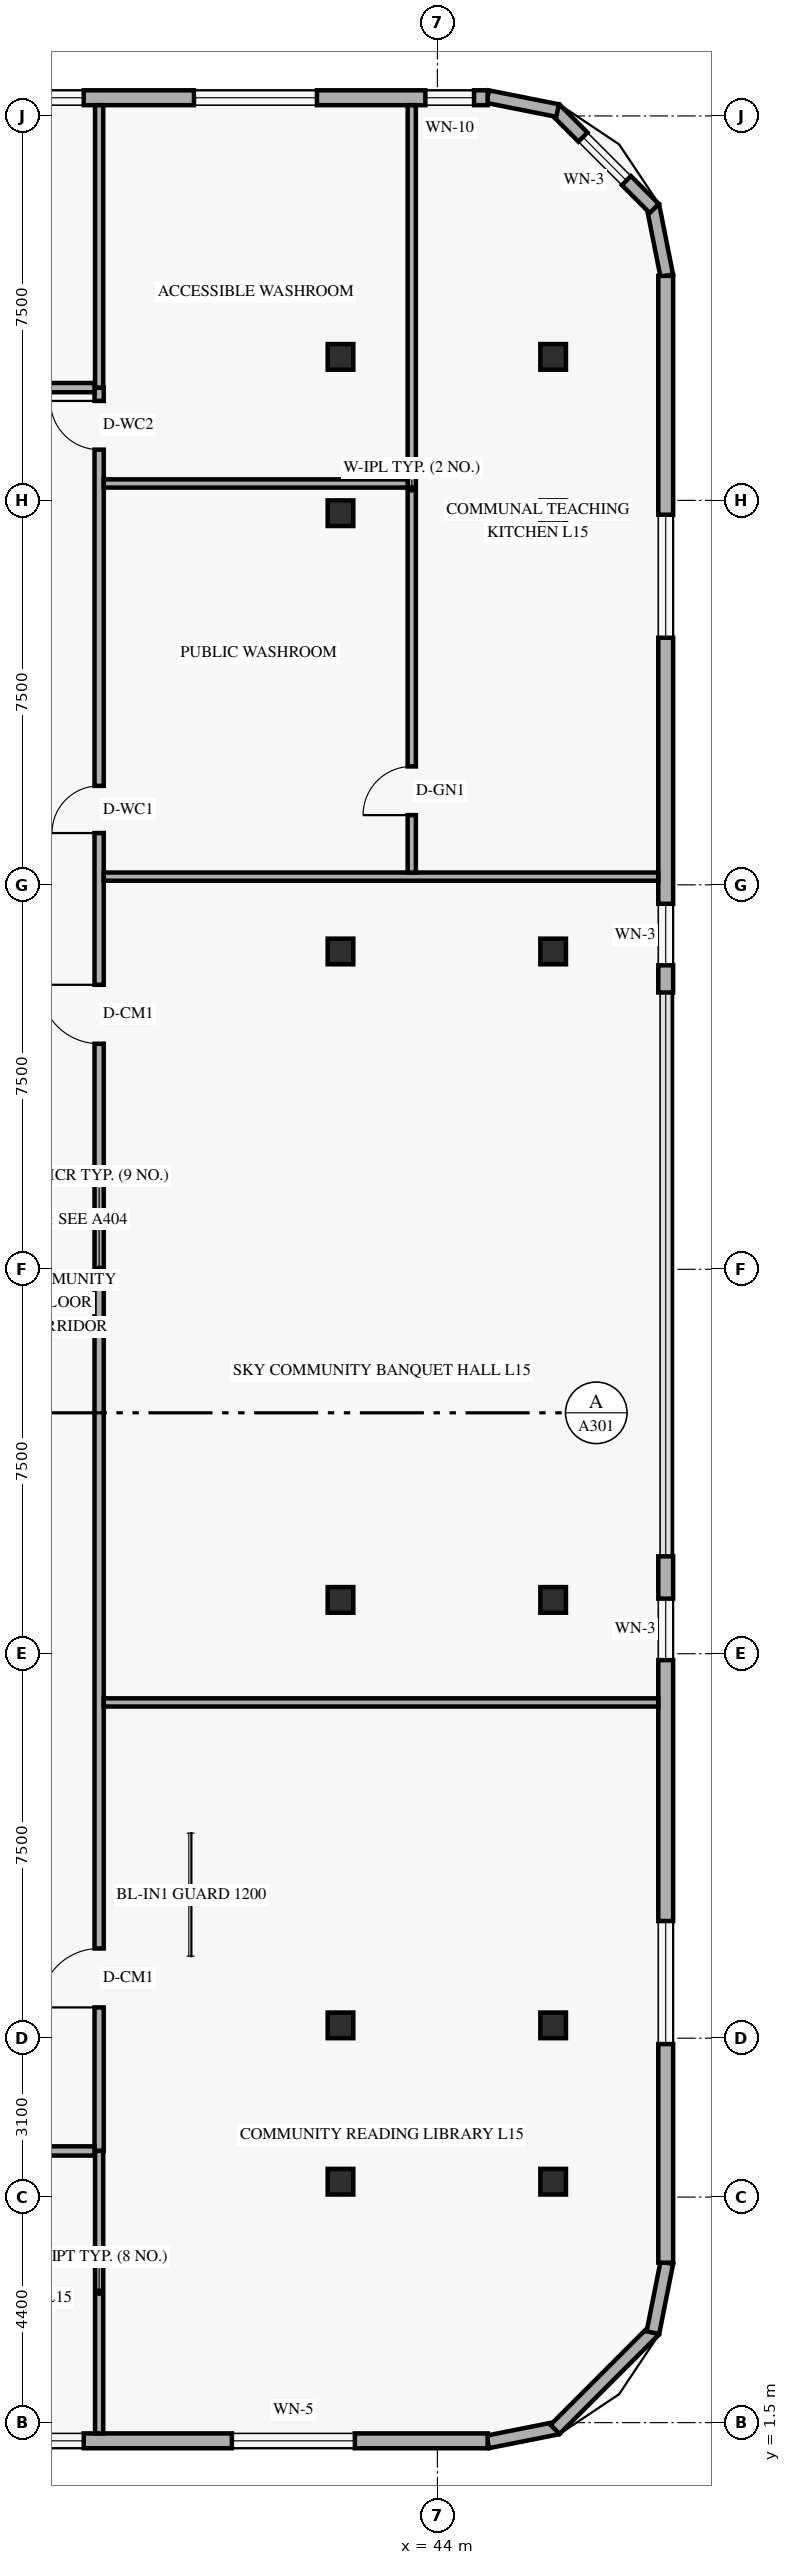
"""IFC4 building model, lengths in metres.
Left out: names, types, materials, properties, quantities, classifications, styles, units other than length and angle.
Written with IfcOpenShell. Run it as: python <this file> out.ifc"""

import sys

from ifc_helpers import new_model, si_unit, direction, frame, frame_2d, origin, origin_2d, place, context, subcontext, project, spatial, rectangle, hollow_rectangle, extrude, element, fill, save


model = new_model("IFC4")
c1 = context("Model", 3, precision=1e-05, world=origin(), true_north=direction((0.0, 1.0)))
c2 = subcontext(c1, "Body", "Model", "MODEL_VIEW")
j1 = project(units=[si_unit("LENGTHUNIT", "METRE"), si_unit("PLANEANGLEUNIT", "RADIAN")], contexts=[c1])
p1 = place(None, origin())
s1 = spatial("IfcSite", under=j1, at=p1, CompositionType="ELEMENT")
p2 = place(p1, origin())
s2 = spatial("IfcBuilding", under=s1, at=p2, CompositionType="ELEMENT")
p3 = place(p2, frame((0.0, 0.0, 60.0)))
s3 = spatial("IfcBuildingStorey", under=s2, at=p3, CompositionType="ELEMENT", Elevation=60.0)
for number, where, z_axis, x_axis in (
    (1, (42.036, 6.2, 0.0), (0.035, 0.0, 0.999), (0.0, 1.0, 0.0)),
    (2, (42.036, 9.25, 0.0), (0.035, 0.0, 0.999), (0.0, 1.0, 0.0)),
    (3, (42.036, 17.55, 0.0), (0.035, 0.0, 0.999), (0.0, 1.0, 0.0)),
    (4, (42.036, 30.2, 0.0), (0.035, 0.0, 0.999), (0.0, 1.0, 0.0)),
    (5, (42.036, 38.75, 0.0), (0.035, 0.0, 0.999), (0.0, 1.0, 0.0)),
    (6, (42.036, 41.8, 0.0), (0.035, 0.0, 0.999), (0.0, 1.0, 0.0)),
):
    element("IfcColumn", number, at=place(p3, frame(where, z_axis=z_axis, x_axis=x_axis)), inside=s3, PredefinedType="COLUMN", context=c2, shape_type="SweptSolid", body=[
        extrude(hollow_rectangle(XDim=0.5, YDim=0.5, WallThickness=0.022, at=origin_2d()), origin(), (0.0, 0.0, 1.0), 4.203),
    ])
for number, where, z_axis, x_axis in (
    (7, (46.137, 6.2, 0.0), (0.058, 0.0, 0.998), (0.0, 1.0, 0.0)),
    (8, (46.137, 9.25, 0.0), (0.058, 0.0, 0.998), (0.0, 1.0, 0.0)),
    (9, (46.137, 17.55, 0.0), (0.058, 0.0, 0.998), (0.0, 1.0, 0.0)),
    (10, (46.137, 30.2, 0.0), (0.058, 0.0, 0.998), (0.0, 1.0, 0.0)),
    (11, (46.137, 38.75, 0.0), (0.058, 0.0, 0.998), (0.0, 1.0, 0.0)),
    (12, (46.137, 41.8, 0.0), (0.058, 0.0, 0.998), (0.0, 1.0, 0.0)),
):
    element("IfcColumn", number, at=place(p3, frame(where, z_axis=z_axis, x_axis=x_axis)), inside=s3, PredefinedType="COLUMN", context=c2, shape_type="SweptSolid", body=[
        extrude(hollow_rectangle(XDim=0.5, YDim=0.5, WallThickness=0.022, at=origin_2d()), origin(), (0.0, 0.0, 1.0), 4.207),
    ])
p4 = place(p3, frame((44.983, 1.124, 0.0), z_axis=(0.0, 0.0, 1.0), x_axis=(0.980809899341, 0.19496651342, 0.0)))
e13 = element("IfcWall", 13, at=p4, inside=s3, PredefinedType="SOLIDWALL", context=c2, shape_type="SweptSolid", body=[
    extrude(rectangle(XDim=1.389, YDim=0.25, at=frame_2d((0.694, 0.0))), origin(), (0.0, 0.0, 1.0), 3.96),
])
p5 = place(p3, frame((46.295, 1.368, 0.0), z_axis=(0.0, 0.0, 1.0), x_axis=(0.707106781187, 0.707106781187, 0.0)))
e14 = element("IfcWall", 14, at=p5, inside=s3, PredefinedType="SOLIDWALL", context=c2, shape_type="SweptSolid", body=[
    extrude(rectangle(XDim=2.739, YDim=0.25, at=frame_2d((1.37, 0.0))), origin(), (0.0, 0.0, 1.0), 3.96),
])
for number, where, z_axis, x_axis in (
    (15, (48.205, 3.254, 0.0), (0.0, 0.0, 1.0), (0.195, 0.981, 0.0)),
    (16, (48.476, 43.384, 0.0), (0.0, 0.0, 1.0), (-0.195, 0.981, 0.0)),
):
    element("IfcWall", number, at=place(p3, frame(where, z_axis=z_axis, x_axis=x_axis)), inside=s3, PredefinedType="SOLIDWALL", context=c2, shape_type="SweptSolid", body=[
        extrude(rectangle(XDim=1.389, YDim=0.25, at=frame_2d((0.694, 0.0))), origin(), (0.0, 0.0, 1.0), 3.96),
    ])
p6 = place(p3, frame((48.232, 44.695, 0.0), z_axis=(0.0, 0.0, 1.0), x_axis=(-0.707106781187, 0.707106781187, 0.0)))
e17 = element("IfcWall", 17, at=p6, inside=s3, PredefinedType="SOLIDWALL", context=c2, shape_type="SweptSolid", body=[
    extrude(rectangle(XDim=2.739, YDim=0.25, at=frame_2d((1.37, 0.0))), origin(), (0.0, 0.0, 1.0), 3.96),
])
p7 = place(p6, frame((0.77, 0.0, 0.85)))
e18 = element("IfcOpeningElement", 18, at=p7, cuts=e17, PredefinedType="OPENING", context=c2, shape_type="SweptSolid", body=[
    extrude(rectangle(XDim=1.2, YDim=1.5, at=frame_2d((0.6, 0.75))), frame((0.0, 0.135, 0.0), z_axis=(0.0, -1.0, 0.0), x_axis=(1.0, 0.0, 0.0)), (0.0, 0.0, 1.0), 0.27),
])
p8 = place(p3, frame((46.345, 46.605, 0.0), z_axis=(0.0, 0.0, 1.0), x_axis=(-0.980809899341, 0.19496651342, 0.0)))
e19 = element("IfcWall", 19, at=p8, inside=s3, PredefinedType="SOLIDWALL", context=c2, shape_type="SweptSolid", body=[
    extrude(rectangle(XDim=1.389, YDim=0.25, at=frame_2d((0.694, 0.0))), origin(), (0.0, 0.0, 1.0), 3.96),
])
p9 = place(p3, frame((34.4, 1.145, 0.0), z_axis=(0.0, 0.0, 1.0), x_axis=(1.0, 0.0, 0.0)))
e20 = element("IfcWall", 20, at=p9, inside=s3, PredefinedType="SOLIDWALL", context=c2, shape_type="SweptSolid", body=[
    extrude(rectangle(XDim=10.58, YDim=0.29, at=frame_2d((5.29, 0.0))), origin(), (0.0, 0.0, 1.0), 3.96),
])
p10 = place(p9, frame((0.3, 0.0, 0.85)))
e21 = element("IfcOpeningElement", 21, at=p10, cuts=e20, PredefinedType="OPENING", context=c2, shape_type="SweptSolid", body=[
    extrude(rectangle(XDim=2.4, YDim=1.9, at=frame_2d((1.2, 0.95))), frame((0.0, 0.155, 0.0), z_axis=(0.0, -1.0, 0.0), x_axis=(1.0, 0.0, 0.0)), (0.0, 0.0, 1.0), 0.31),
])
p11 = place(p9, frame((5.59, 0.0, 0.85)))
e22 = element("IfcOpeningElement", 22, at=p11, cuts=e20, PredefinedType="OPENING", context=c2, shape_type="SweptSolid", body=[
    extrude(rectangle(XDim=2.4, YDim=1.9, at=frame_2d((1.2, 0.95))), frame((0.0, 0.155, 0.0), z_axis=(0.0, -1.0, 0.0), x_axis=(1.0, 0.0, 0.0)), (0.0, 0.0, 1.0), 0.31),
])
p12 = place(p3, frame((48.455, 4.62, 0.0), z_axis=(0.0, 0.0, 1.0), x_axis=(0.0, 1.0, 0.0)))
e23 = element("IfcWall", 23, at=p12, inside=s3, PredefinedType="SOLIDWALL", context=c2, shape_type="SweptSolid", body=[
    extrude(rectangle(XDim=13.78, YDim=0.29, at=frame_2d((6.89, 0.0))), origin(), (0.0, 0.0, 1.0), 3.96),
])
p13 = place(p12, frame((4.265, 0.0, 0.85)))
e24 = element("IfcOpeningElement", 24, at=p13, cuts=e23, PredefinedType="OPENING", context=c2, shape_type="SweptSolid", body=[
    extrude(rectangle(XDim=2.4, YDim=1.9, at=frame_2d((1.2, 0.95))), frame((0.0, 0.155, 0.0), z_axis=(0.0, -1.0, 0.0), x_axis=(1.0, 0.0, 0.0)), (0.0, 0.0, 1.0), 0.31),
])
p14 = place(p12, frame((11.755, 0.0, 0.85)))
e25 = element("IfcOpeningElement", 25, at=p14, cuts=e23, PredefinedType="OPENING", context=c2, shape_type="SweptSolid", body=[
    extrude(rectangle(XDim=1.2, YDim=1.5, at=frame_2d((0.6, 0.75))), frame((0.0, 0.155, 0.0), z_axis=(0.0, -1.0, 0.0), x_axis=(1.0, 0.0, 0.0)), (0.0, 0.0, 1.0), 0.31),
])
p15 = place(p3, frame((48.455, 29.4, 0.0), z_axis=(0.0, 0.0, 1.0), x_axis=(0.0, 1.0, 0.0)))
e26 = element("IfcWall", 26, at=p15, inside=s3, PredefinedType="SOLIDWALL", context=c2, shape_type="SweptSolid", body=[
    extrude(rectangle(XDim=13.98, YDim=0.29, at=frame_2d((6.99, 0.0))), origin(), (0.0, 0.0, 1.0), 3.96),
])
p16 = place(p15, frame((0.53, 0.0, 0.85)))
e27 = element("IfcOpeningElement", 27, at=p16, cuts=e26, PredefinedType="OPENING", context=c2, shape_type="SweptSolid", body=[
    extrude(rectangle(XDim=1.2, YDim=1.5, at=frame_2d((0.6, 0.75))), frame((0.0, 0.155, 0.0), z_axis=(0.0, -1.0, 0.0), x_axis=(1.0, 0.0, 0.0)), (0.0, 0.0, 1.0), 0.31),
])
p17 = place(p15, frame((6.92, 0.0, 0.85)))
e28 = element("IfcOpeningElement", 28, at=p17, cuts=e26, PredefinedType="OPENING", context=c2, shape_type="SweptSolid", body=[
    extrude(rectangle(XDim=2.4, YDim=1.9, at=frame_2d((1.2, 0.95))), frame((0.0, 0.155, 0.0), z_axis=(0.0, -1.0, 0.0), x_axis=(1.0, 0.0, 0.0)), (0.0, 0.0, 1.0), 0.31),
])
p18 = place(p3, frame((44.98, 46.855, 0.0), z_axis=(0.0, 0.0, 1.0), x_axis=(-1.0, 0.0, 0.0)))
e29 = element("IfcWall", 29, at=p18, inside=s3, PredefinedType="SOLIDWALL", context=c2, shape_type="SweptSolid", body=[
    extrude(rectangle(XDim=10.58, YDim=0.29, at=frame_2d((5.29, 0.0))), origin(), (0.0, 0.0, 1.0), 3.96),
])
p19 = place(p18, frame((7.88, 0.0, 0.85)))
e30 = element("IfcOpeningElement", 30, at=p19, cuts=e29, PredefinedType="OPENING", context=c2, shape_type="SweptSolid", body=[
    extrude(rectangle(XDim=2.4, YDim=1.9, at=frame_2d((1.2, 0.95))), frame((0.0, 0.155, 0.0), z_axis=(0.0, -1.0, 0.0), x_axis=(1.0, 0.0, 0.0)), (0.0, 0.0, 1.0), 0.31),
])
p20 = place(p18, frame((3.33, 0.0, 0.85)))
e31 = element("IfcOpeningElement", 31, at=p20, cuts=e29, PredefinedType="OPENING", context=c2, shape_type="SweptSolid", body=[
    extrude(rectangle(XDim=2.4, YDim=1.9, at=frame_2d((1.2, 0.95))), frame((0.0, 0.155, 0.0), z_axis=(0.0, -1.0, 0.0), x_axis=(1.0, 0.0, 0.0)), (0.0, 0.0, 1.0), 0.31),
])
p21 = place(p18, frame((0.265, 0.0, 0.85)))
e32 = element("IfcOpeningElement", 32, at=p21, cuts=e29, PredefinedType="OPENING", context=c2, shape_type="SweptSolid", body=[
    extrude(rectangle(XDim=0.95, YDim=1.5, at=frame_2d((0.475, 0.75))), frame((0.0, 0.155, 0.0), z_axis=(0.0, -1.0, 0.0), x_axis=(1.0, 0.0, 0.0)), (0.0, 0.0, 1.0), 0.31),
])
p22 = place(p3, frame((37.4, 6.8, 0.0), z_axis=(0.0, 0.0, 1.0), x_axis=(0.0, 1.0, 0.0)))
e33 = element("IfcWall", 33, at=p22, inside=s3, PredefinedType="STANDARD", context=c2, shape_type="SweptSolid", body=[
    extrude(rectangle(XDim=34.4, YDim=0.18, at=frame_2d((17.2, 0.0))), origin(), (0.0, 0.0, 1.0), 3.249),
])
p23 = place(p22, frame((25.71, 0.0, 0.0)))
e34 = element("IfcOpeningElement", 34, at=p23, cuts=e33, PredefinedType="OPENING", context=c2, shape_type="SweptSolid", body=[
    extrude(rectangle(XDim=0.92, YDim=2.14, at=frame_2d((0.46, 1.07))), frame((0.0, 0.1, 0.0), z_axis=(0.0, -1.0, 0.0), x_axis=(1.0, 0.0, 0.0)), (0.0, 0.0, 1.0), 0.2),
])
p24 = place(p22, frame((33.19, 0.0, 0.0)))
e35 = element("IfcOpeningElement", 35, at=p24, cuts=e33, PredefinedType="OPENING", context=c2, shape_type="SweptSolid", body=[
    extrude(rectangle(XDim=0.95, YDim=2.14, at=frame_2d((0.475, 1.07))), frame((0.0, 0.1, 0.0), z_axis=(0.0, -1.0, 0.0), x_axis=(1.0, 0.0, 0.0)), (0.0, 0.0, 1.0), 0.2),
])
p25 = place(p22, frame((2.8, 0.0, 0.0)))
e36 = element("IfcOpeningElement", 36, at=p25, cuts=e33, PredefinedType="OPENING", context=c2, shape_type="SweptSolid", body=[
    extrude(rectangle(XDim=1.15, YDim=2.15, at=frame_2d((0.575, 1.075))), frame((0.0, 0.1, 0.0), z_axis=(0.0, -1.0, 0.0), x_axis=(1.0, 0.0, 0.0)), (0.0, 0.0, 1.0), 0.2),
])
p26 = place(p22, frame((21.6, 0.0, 0.0)))
e37 = element("IfcOpeningElement", 37, at=p26, cuts=e33, PredefinedType="OPENING", context=c2, shape_type="SweptSolid", body=[
    extrude(rectangle(XDim=1.15, YDim=2.15, at=frame_2d((0.575, 1.075))), frame((0.0, 0.1, 0.0), z_axis=(0.0, -1.0, 0.0), x_axis=(1.0, 0.0, 0.0)), (0.0, 0.0, 1.0), 0.2),
])
for number, where, z_axis, x_axis in (
    (38, (37.4, 1.29, 0.0), (0.0, 0.0, 1.0), (0.0, 1.0, 0.0)),
    (39, (37.4, 41.2, 0.0), (0.0, 0.0, 1.0), (0.0, 1.0, 0.0)),
):
    element("IfcWall", number, at=place(p3, frame(where, z_axis=z_axis, x_axis=x_axis)), inside=s3, PredefinedType="PARTITIONING", context=c2, shape_type="SweptSolid", body=[
        extrude(rectangle(XDim=5.51, YDim=0.16, at=frame_2d((2.755, 0.0))), origin(), (0.0, 0.0, 1.0), 3.409),
    ])
for number, where, z_axis, x_axis in (
    (40, (37.49, 15.55, 0.0), (0.0, 0.0, 1.0), (1.0, 0.0, 0.0)),
    (41, (37.49, 31.66, 0.0), (0.0, 0.0, 1.0), (1.0, 0.0, 0.0)),
):
    element("IfcWall", number, at=place(p3, frame(where, z_axis=z_axis, x_axis=x_axis)), inside=s3, PredefinedType="PARTITIONING", context=c2, shape_type="SweptSolid", body=[
        extrude(rectangle(XDim=10.82, YDim=0.16, at=frame_2d((5.41, 0.0))), origin(), (0.0, 0.0, 1.0), 3.249),
    ])
p27 = place(p3, frame((43.5, 31.74, 0.0), z_axis=(0.0, 0.0, 1.0), x_axis=(0.0, 1.0, 0.0)))
e42 = element("IfcWall", 42, at=p27, inside=s3, PredefinedType="PLUMBINGWALL", context=c2, shape_type="SweptSolid", body=[
    extrude(rectangle(XDim=14.97, YDim=0.16, at=frame_2d((7.485, 0.0))), origin(), (0.0, 0.0, 1.0), 3.249),
])
p28 = place(p27, frame((1.12, 0.0, 0.0)))
e43 = element("IfcOpeningElement", 43, at=p28, cuts=e42, PredefinedType="OPENING", context=c2, shape_type="SweptSolid", body=[
    extrude(rectangle(XDim=0.95, YDim=2.15, at=frame_2d((0.475, 1.075))), frame((0.0, 0.09, 0.0), z_axis=(0.0, -1.0, 0.0), x_axis=(1.0, 0.0, 0.0)), (0.0, 0.0, 1.0), 0.18),
])
p29 = place(p3, frame((37.49, 39.33, 0.0), z_axis=(0.0, 0.0, 1.0), x_axis=(1.0, 0.0, 0.0)))
e44 = element("IfcWall", 44, at=p29, inside=s3, PredefinedType="PLUMBINGWALL", context=c2, shape_type="SweptSolid", body=[
    extrude(rectangle(XDim=5.93, YDim=0.16, at=frame_2d((2.965, 0.0))), origin(), (0.0, 0.0, 1.0), 3.249),
])
p30 = place(p3, frame((21.74, 6.8, 0.0), z_axis=(0.0, 0.0, 1.0), x_axis=(1.0, 0.0, 0.0)))
e45 = element("IfcWall", 45, at=p30, inside=s3, PredefinedType="STANDARD", context=c2, shape_type="SweptSolid", body=[
    extrude(rectangle(XDim=15.57, YDim=0.18, at=frame_2d((7.785, 0.0))), origin(), (0.0, 0.0, 1.0), 3.249),
])
p31 = place(p30, frame((5.41, 0.0, 0.0)))
e46 = element("IfcOpeningElement", 46, at=p31, cuts=e45, PredefinedType="OPENING", context=c2, shape_type="SweptSolid", body=[
    extrude(rectangle(XDim=0.95, YDim=2.15, at=frame_2d((0.475, 1.075))), frame((0.0, 0.1, 0.0), z_axis=(0.0, -1.0, 0.0), x_axis=(1.0, 0.0, 0.0)), (0.0, 0.0, 1.0), 0.2),
])
p32 = place(p3, frame((21.74, 41.2, 0.0), z_axis=(0.0, 0.0, 1.0), x_axis=(1.0, 0.0, 0.0)))
e47 = element("IfcWall", 47, at=p32, inside=s3, PredefinedType="STANDARD", context=c2, shape_type="SweptSolid", body=[
    extrude(rectangle(XDim=15.57, YDim=0.18, at=frame_2d((7.785, 0.0))), origin(), (0.0, 0.0, 1.0), 3.249),
])
p33 = place(p32, frame((5.41, 0.0, 0.0)))
e48 = element("IfcOpeningElement", 48, at=p33, cuts=e47, PredefinedType="OPENING", context=c2, shape_type="SweptSolid", body=[
    extrude(rectangle(XDim=0.95, YDim=2.15, at=frame_2d((0.475, 1.075))), frame((0.0, 0.1, 0.0), z_axis=(0.0, -1.0, 0.0), x_axis=(1.0, 0.0, 0.0)), (0.0, 0.0, 1.0), 0.2),
])
p34 = place(p7, origin())
e49 = element("IfcWindow", 49, at=p34, inside=s3, PartitioningType="SINGLE_PANEL", PredefinedType="WINDOW", context=c2, shape_type="SweptSolid", body=[
    extrude(rectangle(XDim=1.2, YDim=1.5, at=frame_2d((0.6, 0.75))), frame((0.0, 0.03, 0.0), z_axis=(0.0, -1.0, 0.0), x_axis=(1.0, 0.0, 0.0)), (0.0, 0.0, 1.0), 0.06),
])
fill(e18, e49)
p35 = place(p10, origin())
e50 = element("IfcWindow", 50, at=p35, inside=s3, PartitioningType="SINGLE_PANEL", PredefinedType="WINDOW", context=c2, shape_type="SweptSolid", body=[
    extrude(rectangle(XDim=2.4, YDim=1.9, at=frame_2d((1.2, 0.95))), frame((0.0, 0.03, 0.0), z_axis=(0.0, -1.0, 0.0), x_axis=(1.0, 0.0, 0.0)), (0.0, 0.0, 1.0), 0.06),
])
fill(e21, e50)
p36 = place(p11, origin())
e51 = element("IfcWindow", 51, at=p36, inside=s3, PartitioningType="SINGLE_PANEL", PredefinedType="WINDOW", context=c2, shape_type="SweptSolid", body=[
    extrude(rectangle(XDim=2.4, YDim=1.9, at=frame_2d((1.2, 0.95))), frame((0.0, 0.03, 0.0), z_axis=(0.0, -1.0, 0.0), x_axis=(1.0, 0.0, 0.0)), (0.0, 0.0, 1.0), 0.06),
])
fill(e22, e51)
p37 = place(p13, origin())
e52 = element("IfcWindow", 52, at=p37, inside=s3, PartitioningType="SINGLE_PANEL", PredefinedType="WINDOW", context=c2, shape_type="SweptSolid", body=[
    extrude(rectangle(XDim=2.4, YDim=1.9, at=frame_2d((1.2, 0.95))), frame((0.0, 0.03, 0.0), z_axis=(0.0, -1.0, 0.0), x_axis=(1.0, 0.0, 0.0)), (0.0, 0.0, 1.0), 0.06),
])
fill(e24, e52)
p38 = place(p14, origin())
e53 = element("IfcWindow", 53, at=p38, inside=s3, PartitioningType="SINGLE_PANEL", PredefinedType="WINDOW", context=c2, shape_type="SweptSolid", body=[
    extrude(rectangle(XDim=1.2, YDim=1.5, at=frame_2d((0.6, 0.75))), frame((0.0, 0.03, 0.0), z_axis=(0.0, -1.0, 0.0), x_axis=(1.0, 0.0, 0.0)), (0.0, 0.0, 1.0), 0.06),
])
fill(e25, e53)
p39 = place(p16, origin())
e54 = element("IfcWindow", 54, at=p39, inside=s3, PartitioningType="SINGLE_PANEL", PredefinedType="WINDOW", context=c2, shape_type="SweptSolid", body=[
    extrude(rectangle(XDim=1.2, YDim=1.5, at=frame_2d((0.6, 0.75))), frame((0.0, 0.03, 0.0), z_axis=(0.0, -1.0, 0.0), x_axis=(1.0, 0.0, 0.0)), (0.0, 0.0, 1.0), 0.06),
])
fill(e27, e54)
p40 = place(p17, origin())
e55 = element("IfcWindow", 55, at=p40, inside=s3, PartitioningType="SINGLE_PANEL", PredefinedType="WINDOW", context=c2, shape_type="SweptSolid", body=[
    extrude(rectangle(XDim=2.4, YDim=1.9, at=frame_2d((1.2, 0.95))), frame((0.0, 0.03, 0.0), z_axis=(0.0, -1.0, 0.0), x_axis=(1.0, 0.0, 0.0)), (0.0, 0.0, 1.0), 0.06),
])
fill(e28, e55)
p41 = place(p19, origin())
e56 = element("IfcWindow", 56, at=p41, inside=s3, PartitioningType="SINGLE_PANEL", PredefinedType="WINDOW", context=c2, shape_type="SweptSolid", body=[
    extrude(rectangle(XDim=2.4, YDim=1.9, at=frame_2d((1.2, 0.95))), frame((0.0, 0.03, 0.0), z_axis=(0.0, -1.0, 0.0), x_axis=(1.0, 0.0, 0.0)), (0.0, 0.0, 1.0), 0.06),
])
fill(e30, e56)
p42 = place(p20, origin())
e57 = element("IfcWindow", 57, at=p42, inside=s3, PartitioningType="SINGLE_PANEL", PredefinedType="WINDOW", context=c2, shape_type="SweptSolid", body=[
    extrude(rectangle(XDim=2.4, YDim=1.9, at=frame_2d((1.2, 0.95))), frame((0.0, 0.03, 0.0), z_axis=(0.0, -1.0, 0.0), x_axis=(1.0, 0.0, 0.0)), (0.0, 0.0, 1.0), 0.06),
])
fill(e31, e57)
p43 = place(p21, origin())
e58 = element("IfcWindow", 58, at=p43, inside=s3, PartitioningType="SINGLE_PANEL", PredefinedType="WINDOW", context=c2, shape_type="SweptSolid", body=[
    extrude(rectangle(XDim=0.95, YDim=1.5, at=frame_2d((0.475, 0.75))), frame((0.0, 0.03, 0.0), z_axis=(0.0, -1.0, 0.0), x_axis=(1.0, 0.0, 0.0)), (0.0, 0.0, 1.0), 0.06),
])
fill(e32, e58)
p44 = place(p23, origin())
e59 = element("IfcDoor", 59, at=p44, inside=s3, OperationType="SINGLE_SWING_LEFT", PredefinedType="DOOR", context=c2, shape_type="SweptSolid", body=[
    extrude(rectangle(XDim=0.92, YDim=2.14, at=frame_2d((0.46, 1.07))), frame((0.0, 0.025, 0.0), z_axis=(0.0, -1.0, 0.0), x_axis=(1.0, 0.0, 0.0)), (0.0, 0.0, 1.0), 0.05),
])
fill(e34, e59)
p45 = place(p24, origin())
e60 = element("IfcDoor", 60, at=p45, inside=s3, OperationType="SINGLE_SWING_RIGHT", PredefinedType="DOOR", context=c2, shape_type="SweptSolid", body=[
    extrude(rectangle(XDim=0.95, YDim=2.14, at=frame_2d((0.475, 1.07))), frame((0.0, 0.025, 0.0), z_axis=(0.0, -1.0, 0.0), x_axis=(1.0, 0.0, 0.0)), (0.0, 0.0, 1.0), 0.05),
])
fill(e35, e60)
p46 = place(p28, origin())
e61 = element("IfcDoor", 61, at=p46, inside=s3, OperationType="SINGLE_SWING_LEFT", PredefinedType="DOOR", context=c2, shape_type="SweptSolid", body=[
    extrude(rectangle(XDim=0.95, YDim=2.15, at=frame_2d((0.475, 1.075))), frame((0.0, 0.025, 0.0), z_axis=(0.0, -1.0, 0.0), x_axis=(1.0, 0.0, 0.0)), (0.0, 0.0, 1.0), 0.05),
])
fill(e43, e61)
p47 = place(p25, origin())
e62 = element("IfcDoor", 62, at=p47, inside=s3, OperationType="SINGLE_SWING_LEFT", PredefinedType="DOOR", context=c2, shape_type="SweptSolid", body=[
    extrude(rectangle(XDim=1.15, YDim=2.15, at=frame_2d((0.575, 1.075))), frame((0.0, 0.025, 0.0), z_axis=(0.0, -1.0, 0.0), x_axis=(1.0, 0.0, 0.0)), (0.0, 0.0, 1.0), 0.05),
])
fill(e36, e62)
p48 = place(p26, origin())
e63 = element("IfcDoor", 63, at=p48, inside=s3, OperationType="SINGLE_SWING_RIGHT", PredefinedType="DOOR", context=c2, shape_type="SweptSolid", body=[
    extrude(rectangle(XDim=1.15, YDim=2.15, at=frame_2d((0.575, 1.075))), frame((0.0, 0.025, 0.0), z_axis=(0.0, -1.0, 0.0), x_axis=(1.0, 0.0, 0.0)), (0.0, 0.0, 1.0), 0.05),
])
fill(e37, e63)
save(model, sys.argv[1])
